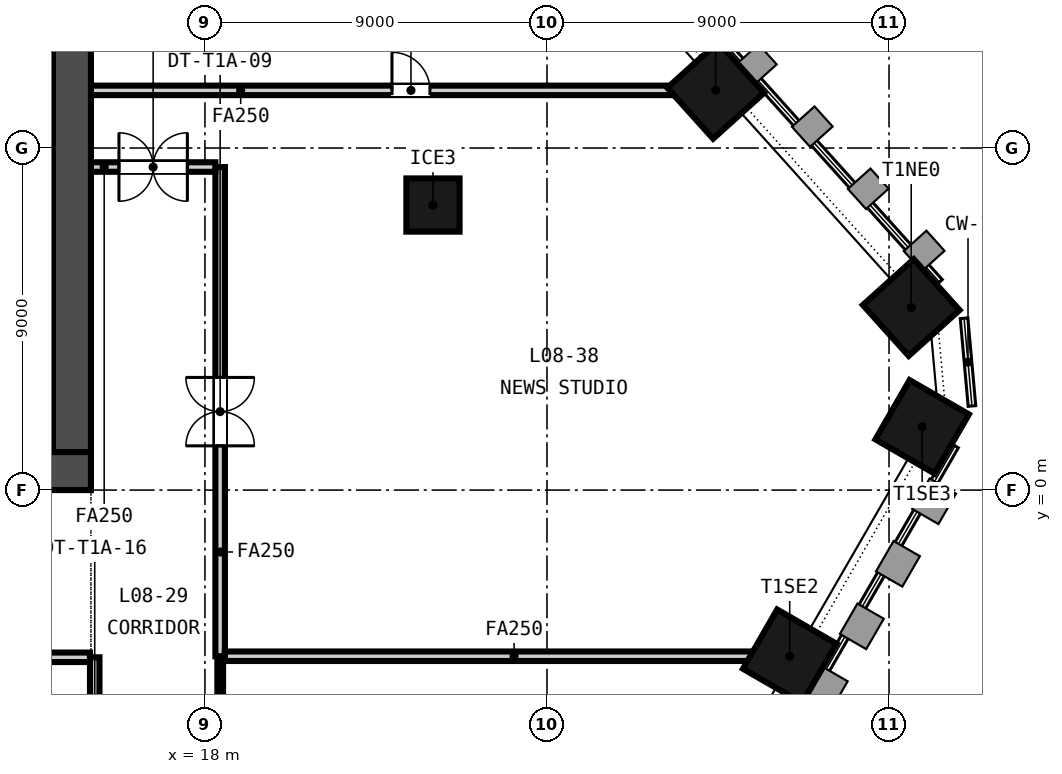
"""IFC4 building model, lengths in metres.
Left out: names, types, materials, properties, quantities, classifications, styles, units other than length and angle.
Written with IfcOpenShell. Run it as: python <this file> out.ifc"""

import sys

from ifc_helpers import new_model, si_unit, direction, frame, frame_2d, origin, origin_2d, place, context, subcontext, project, spatial, rectangle, extrude, element, fill, save


model = new_model("IFC4")
c1 = context("Model", 3, precision=1e-05, world=origin(), true_north=direction((0.0, 1.0)))
c2 = subcontext(c1, "Body", "Model", "MODEL_VIEW")
j1 = project(units=[si_unit("LENGTHUNIT", "METRE"), si_unit("PLANEANGLEUNIT", "RADIAN")], contexts=[c1])
p1 = place(None, origin())
s1 = spatial("IfcSite", under=j1, at=p1, CompositionType="ELEMENT")
p2 = place(p1, origin())
s2 = spatial("IfcBuilding", under=s1, at=p2, CompositionType="ELEMENT")
p3 = place(p2, frame((0.0, 0.0, 43.3)))
s3 = spatial("IfcBuildingStorey", under=s2, at=p3, CompositionType="ELEMENT", Elevation=43.3)
p4 = place(p3, frame((-15.0, 0.5, -0.15), z_axis=(0.0, 0.0, 1.0), x_axis=(1.0, 0.0, 0.0)))
e1 = element("IfcWall", 1, at=p4, inside=s3, PredefinedType="SOLIDWALL", context=c2, shape_type="SweptSolid", body=[
    extrude(rectangle(XDim=30.0, YDim=1.0, at=frame_2d((15.0, 0.0))), origin(), (0.0, 0.0, 1.0), 3.65),
])
p5 = place(p4, frame((5.8, 0.0, 0.15)))
e2 = element("IfcOpeningElement", 2, at=p5, cuts=e1, PredefinedType="OPENING", context=c2, shape_type="SweptSolid", body=[
    extrude(rectangle(XDim=2.4, YDim=2.4, at=frame_2d((1.2, 1.2))), frame((0.0, 0.51, 0.0), z_axis=(0.0, -1.0, 0.0), x_axis=(1.0, 0.0, 0.0)), (0.0, 0.0, 1.0), 1.02),
])
p6 = place(p4, frame((13.8, 0.0, 0.15)))
e3 = element("IfcOpeningElement", 3, at=p6, cuts=e1, PredefinedType="OPENING", context=c2, shape_type="SweptSolid", body=[
    extrude(rectangle(XDim=2.4, YDim=2.4, at=frame_2d((1.2, 1.2))), frame((0.0, 0.51, 0.0), z_axis=(0.0, -1.0, 0.0), x_axis=(1.0, 0.0, 0.0)), (0.0, 0.0, 1.0), 1.02),
])
p7 = place(p4, frame((21.8, 0.0, 0.15)))
e4 = element("IfcOpeningElement", 4, at=p7, cuts=e1, PredefinedType="OPENING", context=c2, shape_type="SweptSolid", body=[
    extrude(rectangle(XDim=2.4, YDim=2.4, at=frame_2d((1.2, 1.2))), frame((0.0, 0.51, 0.0), z_axis=(0.0, -1.0, 0.0), x_axis=(1.0, 0.0, 0.0)), (0.0, 0.0, 1.0), 1.02),
])
p8 = place(p4, frame((1.5, 0.0, 0.15)))
e5 = element("IfcOpeningElement", 5, at=p8, cuts=e1, PredefinedType="OPENING", context=c2, shape_type="SweptSolid", body=[
    extrude(rectangle(XDim=1.2, YDim=2.1, at=frame_2d((0.6, 1.05))), frame((0.0, 0.51, 0.0), z_axis=(0.0, -1.0, 0.0), x_axis=(1.0, 0.0, 0.0)), (0.0, 0.0, 1.0), 1.02),
])
p9 = place(p4, frame((27.3, 0.0, 0.15)))
e6 = element("IfcOpeningElement", 6, at=p9, cuts=e1, PredefinedType="OPENING", context=c2, shape_type="SweptSolid", body=[
    extrude(rectangle(XDim=1.2, YDim=2.1, at=frame_2d((0.6, 1.05))), frame((0.0, 0.51, 0.0), z_axis=(0.0, -1.0, 0.0), x_axis=(1.0, 0.0, 0.0)), (0.0, 0.0, 1.0), 1.02),
])
p10 = place(p3, frame((14.5, 1.0, -0.15), z_axis=(0.0, 0.0, 1.0), x_axis=(0.0, 1.0, 0.0)))
e7 = element("IfcWall", 7, at=p10, inside=s3, PredefinedType="SOLIDWALL", context=c2, shape_type="SweptSolid", body=[
    extrude(rectangle(XDim=13.0, YDim=1.0, at=frame_2d((6.5, 0.0))), origin(), (0.0, 0.0, 1.0), 3.65),
])
for number, where, z_axis, x_axis in (
    (8, (33.387, -4.373, -0.15), (0.0, 0.0, 1.0), (0.5, 0.866, 0.0)),
    (9, (36.872, 1.663, -0.15), (0.0, 0.0, 1.0), (0.5, 0.866, 0.0)),
    (10, (36.584, 4.803, -0.15), (0.0, 0.0, 1.0), (-0.669, 0.743, 0.0)),
    (11, (31.438, 10.517, -0.15), (0.0, 0.0, 1.0), (-0.669, 0.743, 0.0)),
):
    element("IfcColumn", number, at=place(p3, frame(where, z_axis=z_axis, x_axis=x_axis)), inside=s3, PredefinedType="COLUMN", context=c2, shape_type="SweptSolid", body=[
        extrude(rectangle(XDim=1.8, YDim=1.8, at=origin_2d()), origin(), (0.0, 0.0, 1.0), 3.65),
    ])
p11 = place(p3, frame((24.0, 7.5, -0.15), z_axis=(0.0, 0.0, 1.0), x_axis=(1.0, 0.0, 0.0)))
e12 = element("IfcColumn", 12, at=p11, inside=s3, PredefinedType="COLUMN", context=c2, shape_type="SweptSolid", body=[
    extrude(rectangle(XDim=1.4, YDim=1.4, at=origin_2d()), origin(), (0.0, 0.0, 1.0), 3.65),
])
p12 = place(p3, frame((11.05, 7.35, -0.15), z_axis=(0.0, 0.0, 1.0), x_axis=(1.0, 0.0, 0.0)))
e13 = element("IfcWall", 13, at=p12, inside=s3, PredefinedType="SOLIDWALL", context=c2, shape_type="SweptSolid", body=[
    extrude(rectangle(XDim=2.95, YDim=0.3, at=frame_2d((1.475, 0.0))), origin(), (0.0, 0.0, 1.0), 3.65),
])
p13 = place(p3, frame((14.975, -4.4, 0.0), z_axis=(0.0, 0.0, 1.0), x_axis=(-1.0, 0.0, 0.0)))
e14 = element("IfcWall", 14, at=p13, inside=s3, PredefinedType="PARTITIONING", context=c2, shape_type="SweptSolid", body=[
    extrude(rectangle(XDim=4.783, YDim=0.25, at=frame_2d((2.392, 0.0))), origin(), (0.0, 0.0, 1.0), 2.741),
])
p14 = place(p13, frame((1.479, 0.0, 0.0)))
e15 = element("IfcOpeningElement", 15, at=p14, cuts=e14, PredefinedType="OPENING", context=c2, shape_type="SweptSolid", body=[
    extrude(rectangle(XDim=1.8, YDim=2.1, at=frame_2d((0.9, 1.05))), frame((0.0, 0.135, 0.0), z_axis=(0.0, -1.0, 0.0), x_axis=(1.0, 0.0, 0.0)), (0.0, 0.0, 1.0), 0.27),
])
p15 = place(p3, frame((18.4, 8.5, 0.0), z_axis=(0.0, 0.0, 1.0), x_axis=(0.0, -1.0, 0.0)))
e16 = element("IfcWall", 16, at=p15, inside=s3, PredefinedType="PARTITIONING", context=c2, shape_type="SweptSolid", body=[
    extrude(rectangle(XDim=12.872, YDim=0.25, at=frame_2d((6.436, 0.0))), origin(), (0.0, 0.0, 1.0), 2.741),
])
p16 = place(p15, frame((5.536, 0.0, 0.0)))
e17 = element("IfcOpeningElement", 17, at=p16, cuts=e16, PredefinedType="OPENING", context=c2, shape_type="SweptSolid", body=[
    extrude(rectangle(XDim=1.8, YDim=2.1, at=frame_2d((0.9, 1.05))), frame((0.0, 0.135, 0.0), z_axis=(0.0, -1.0, 0.0), x_axis=(1.0, 0.0, 0.0)), (0.0, 0.0, 1.0), 0.27),
])
p17 = place(p3, frame((18.402, -4.398, 0.0), z_axis=(0.0, 0.0, 1.0), x_axis=(0.0, -1.0, 0.0)))
e18 = element("IfcWall", 18, at=p17, inside=s3, PredefinedType="PARTITIONING", context=c2, shape_type="SweptSolid", body=[
    extrude(rectangle(XDim=3.952, YDim=0.15, at=frame_2d((1.976, 0.0))), origin(), (0.0, 0.0, 1.0), 2.741),
])
p18 = place(p17, frame((1.476, 0.0, 0.0)))
e19 = element("IfcOpeningElement", 19, at=p18, cuts=e18, PredefinedType="OPENING", context=c2, shape_type="SweptSolid", body=[
    extrude(rectangle(XDim=1.0, YDim=2.1, at=frame_2d((0.5, 1.05))), frame((0.0, 0.085, 0.0), z_axis=(0.0, -1.0, 0.0), x_axis=(1.0, 0.0, 0.0)), (0.0, 0.0, 1.0), 0.17),
])
p19 = place(p3, frame((15.0, 10.517, 0.0), z_axis=(0.0, 0.0, 1.0), x_axis=(1.0, 0.0, 0.0)))
e20 = element("IfcWall", 20, at=p19, inside=s3, PredefinedType="PARTITIONING", context=c2, shape_type="SweptSolid", body=[
    extrude(rectangle(XDim=16.842, YDim=0.25, at=frame_2d((8.421, 0.0))), origin(), (0.0, 0.0, 1.0), 2.741),
])
p20 = place(p19, frame((7.921, 0.0, 0.0)))
e21 = element("IfcOpeningElement", 21, at=p20, cuts=e20, PredefinedType="OPENING", context=c2, shape_type="SweptSolid", body=[
    extrude(rectangle(XDim=1.0, YDim=2.1, at=frame_2d((0.5, 1.05))), frame((0.0, 0.135, 0.0), z_axis=(0.0, -1.0, 0.0), x_axis=(1.0, 0.0, 0.0)), (0.0, 0.0, 1.0), 0.27),
])
p21 = place(p3, frame((15.0, 8.5, 0.0), z_axis=(0.0, 0.0, 1.0), x_axis=(1.0, 0.0, 0.0)))
e22 = element("IfcWall", 22, at=p21, inside=s3, PredefinedType="PARTITIONING", context=c2, shape_type="SweptSolid", body=[
    extrude(rectangle(XDim=3.275, YDim=0.25, at=frame_2d((1.637, 0.0))), origin(), (0.0, 0.0, 1.0), 2.741),
])
p22 = place(p21, frame((0.738, 0.0, 0.0)))
e23 = element("IfcOpeningElement", 23, at=p22, cuts=e22, PredefinedType="OPENING", context=c2, shape_type="SweptSolid", body=[
    extrude(rectangle(XDim=1.8, YDim=2.1, at=frame_2d((0.9, 1.05))), frame((0.0, 0.135, 0.0), z_axis=(0.0, -1.0, 0.0), x_axis=(1.0, 0.0, 0.0)), (0.0, 0.0, 1.0), 0.27),
])
p23 = place(p3, frame((18.525, -4.372, 0.0), z_axis=(0.0, 0.0, 1.0), x_axis=(1.0, 0.0, 0.0)))
e24 = element("IfcWall", 24, at=p23, inside=s3, PredefinedType="PARTITIONING", context=c2, shape_type="SweptSolid", body=[
    extrude(rectangle(XDim=15.208, YDim=0.25, at=frame_2d((7.604, 0.0))), origin(), (0.0, 0.0, 1.0), 2.741),
])
p24 = place(p3, frame((15.1, -12.275, 0.0), z_axis=(0.0, 0.0, 1.0), x_axis=(0.0, 1.0, 0.0)))
e25 = element("IfcWall", 25, at=p24, inside=s3, PredefinedType="PARTITIONING", context=c2, shape_type="SweptSolid", body=[
    extrude(rectangle(XDim=7.875, YDim=0.25, at=frame_2d((3.938, 0.0))), origin(), (0.0, 0.0, 1.0), 2.741),
])
p25 = place(p24, frame((3.038, 0.0, 0.0)))
e26 = element("IfcOpeningElement", 26, at=p25, cuts=e25, PredefinedType="OPENING", context=c2, shape_type="SweptSolid", body=[
    extrude(rectangle(XDim=1.8, YDim=2.1, at=frame_2d((0.9, 1.05))), frame((0.0, 0.135, 0.0), z_axis=(0.0, -1.0, 0.0), x_axis=(1.0, 0.0, 0.0)), (0.0, 0.0, 1.0), 0.27),
])
p26 = place(p16, origin())
e27 = element("IfcDoor", 27, at=p26, inside=s3, OperationType="DOUBLE_DOOR_DOUBLE_SWING", PredefinedType="DOOR", context=c2, shape_type="SweptSolid", body=[
    extrude(rectangle(XDim=1.8, YDim=2.1, at=frame_2d((0.9, 1.05))), frame((0.0, 0.025, 0.0), z_axis=(0.0, -1.0, 0.0), x_axis=(1.0, 0.0, 0.0)), (0.0, 0.0, 1.0), 0.05),
])
fill(e17, e27)
p27 = place(p22, origin())
e28 = element("IfcDoor", 28, at=p27, inside=s3, OperationType="DOUBLE_DOOR_DOUBLE_SWING", PredefinedType="DOOR", context=c2, shape_type="SweptSolid", body=[
    extrude(rectangle(XDim=1.8, YDim=2.1, at=frame_2d((0.9, 1.05))), frame((0.0, 0.025, 0.0), z_axis=(0.0, -1.0, 0.0), x_axis=(1.0, 0.0, 0.0)), (0.0, 0.0, 1.0), 0.05),
])
fill(e23, e28)
p28 = place(p20, origin())
e29 = element("IfcDoor", 29, at=p28, inside=s3, OperationType="SINGLE_SWING_LEFT", PredefinedType="DOOR", context=c2, shape_type="SweptSolid", body=[
    extrude(rectangle(XDim=1.0, YDim=2.1, at=frame_2d((0.5, 1.05))), frame((0.0, 0.025, 0.0), z_axis=(0.0, -1.0, 0.0), x_axis=(1.0, 0.0, 0.0)), (0.0, 0.0, 1.0), 0.05),
])
fill(e21, e29)
save(model, sys.argv[1])
